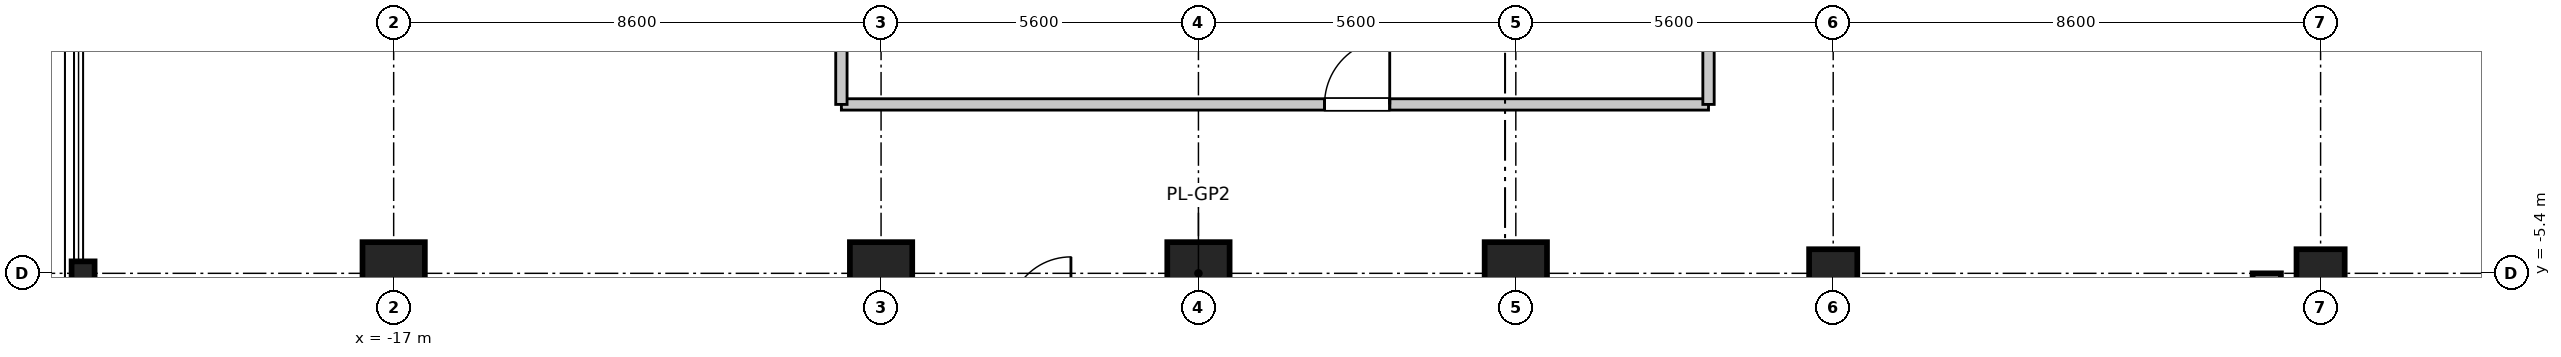
"""IFC4 building model, lengths in metres.
Left out: names, types, materials, properties, quantities, classifications, styles, units other than length and angle.
Written with IfcOpenShell. Run it as: python <this file> out.ifc"""

import sys

from ifc_helpers import new_model, si_unit, direction, frame, frame_2d, origin, origin_2d, place, context, subcontext, project, spatial, rectangle, i_section, extrude, source, transform, mapped, element, fill, save


model = new_model("IFC4")
c1 = context("Model", 3, precision=1e-05, world=origin(), true_north=direction((0.0, 1.0)))
c2 = subcontext(c1, "Body", "Model", "MODEL_VIEW")
j1 = project(units=[si_unit("LENGTHUNIT", "METRE"), si_unit("PLANEANGLEUNIT", "RADIAN")], contexts=[c1])
p1 = place(None, origin())
s1 = spatial("IfcSite", under=j1, at=p1, CompositionType="ELEMENT")
p2 = place(p1, origin())
s2 = spatial("IfcBuilding", under=s1, at=p2, CompositionType="ELEMENT")
p3 = place(p2, frame((0.0, 0.0, 200.1)))
s3 = spatial("IfcBuildingStorey", under=s2, at=p3, CompositionType="ELEMENT", Elevation=200.1)
m1 = source(origin(), c2, "Body", "SweptSolid", [
    extrude(rectangle(XDim=1.1, YDim=1.1, at=origin_2d()), origin(), (0.0, 0.0, 1.0), 4.755),
])
for number, where, z_axis, x_axis in (
    (1, (-17.0, -5.4, 0.0), (0.0, 0.0, 1.0), (1.0, 0.0, 0.0)),
    (2, (-8.4, -5.4, 0.0), (0.0, 0.0, 1.0), (1.0, 0.0, 0.0)),
    (3, (-2.8, -5.4, 0.0), (0.0, 0.0, 1.0), (1.0, 0.0, 0.0)),
    (4, (2.8, -5.4, 0.0), (0.0, 0.0, 1.0), (1.0, 0.0, 0.0)),
):
    element("IfcColumn", number, at=place(p3, frame(where, z_axis=z_axis, x_axis=x_axis)), inside=s3, PredefinedType="COLUMN", context=c2, shape_type="MappedRepresentation", body=[
        mapped(m1, transform((0.0, 0.0, 0.0), scale=1.0)),
    ])
m2 = source(origin(), c2, "Body", "SweptSolid", [
    extrude(rectangle(XDim=0.85, YDim=0.85, at=origin_2d()), origin(), (0.0, 0.0, 1.0), 4.755),
])
for number, where, z_axis, x_axis in (
    (5, (8.4, -5.4, 0.0), (0.0, 0.0, 1.0), (1.0, 0.0, 0.0)),
    (6, (17.0, -5.4, 0.0), (0.0, 0.0, 1.0), (1.0, 0.0, 0.0)),
):
    element("IfcColumn", number, at=place(p3, frame(where, z_axis=z_axis, x_axis=x_axis)), inside=s3, PredefinedType="PILASTER", context=c2, shape_type="MappedRepresentation", body=[
        mapped(m2, transform((0.0, 0.0, 0.0), scale=1.0)),
    ])
m3 = source(origin(), c2, "Body", "SweptSolid", [
    extrude(i_section(OverallWidth=0.406, OverallDepth=0.422, WebThickness=0.019, FlangeThickness=0.03, at=origin_2d()), origin(), (0.0, 0.0, 1.0), 4.861),
])
p4 = place(p3, frame((-22.48, -5.4, 0.0), z_axis=(-0.288002153126, 0.0, 0.957629761335), x_axis=(0.0, -1.0, 0.0)))
e7 = element("IfcColumn", 7, at=p4, inside=s3, PredefinedType="COLUMN", context=c2, shape_type="MappedRepresentation", body=[
    mapped(m3, transform((0.0, 0.0, 0.0), scale=1.0)),
])
m4 = source(origin(), c2, "Body", "SweptSolid", [
    extrude(rectangle(XDim=11.6, YDim=0.5, at=frame_2d((5.8, 0.0))), origin(), (0.0, 0.0, 1.0), 4.51),
])
p5 = place(p3, frame((16.05, -17.0, 0.0), z_axis=(0.0, 0.0, 1.0), x_axis=(0.0, 1.0, 0.0)))
e8 = element("IfcWall", 8, at=p5, inside=s3, PredefinedType="SHEAR", context=c2, shape_type="MappedRepresentation", body=[
    mapped(m4, transform((0.0, 0.0, 0.0), scale=1.0)),
])
m5 = source(origin(), c2, "Body", "SweptSolid", [
    extrude(rectangle(XDim=15.3, YDim=0.2, at=frame_2d((7.65, 0.0))), origin(), (0.0, 0.0, 1.0), 3.4),
])
p6 = place(p3, frame((-9.1, -2.42, 0.0), z_axis=(0.0, 0.0, 1.0), x_axis=(1.0, 0.0, 0.0)))
e9 = element("IfcWall", 9, at=p6, inside=s3, PredefinedType="PARTITIONING", context=c2, shape_type="MappedRepresentation", body=[
    mapped(m5, transform((0.0, 0.0, 0.0), scale=1.0)),
])
p7 = place(p6, frame((8.525, 0.0, 0.0)))
e10 = element("IfcOpeningElement", 10, at=p7, cuts=e9, PredefinedType="OPENING", context=c2, shape_type="SweptSolid", body=[
    extrude(rectangle(XDim=1.15, YDim=2.15, at=frame_2d((0.575, 1.075))), frame((0.0, 0.11, 0.0), z_axis=(0.0, -1.0, 0.0), x_axis=(1.0, 0.0, 0.0)), (0.0, 0.0, 1.0), 0.22),
])
m6 = source(origin(), c2, "Body", "SweptSolid", [
    extrude(rectangle(XDim=4.84, YDim=0.2, at=frame_2d((2.42, 0.0))), origin(), (0.0, 0.0, 1.0), 3.4),
])
for number, where, z_axis, x_axis in (
    (11, (-9.1, -2.42, 0.0), (0.0, 0.0, 1.0), (0.0, 1.0, 0.0)),
    (12, (6.2, -2.42, 0.0), (0.0, 0.0, 1.0), (0.0, 1.0, 0.0)),
):
    element("IfcWall", number, at=place(p3, frame(where, z_axis=z_axis, x_axis=x_axis)), inside=s3, PredefinedType="PARTITIONING", context=c2, shape_type="MappedRepresentation", body=[
        mapped(m6, transform((0.0, 0.0, 0.0), scale=1.0)),
    ])
m7 = source(origin(), c2, "Body", "SweptSolid", [
    extrude(rectangle(XDim=1.15, YDim=2.15, at=frame_2d((0.575, 1.075))), frame((0.0, 0.025, 0.0), z_axis=(0.0, -1.0, 0.0), x_axis=(1.0, 0.0, 0.0)), (0.0, 0.0, 1.0), 0.05),
])
p8 = place(p7, origin())
e13 = element("IfcDoor", 13, at=p8, inside=s3, OperationType="SINGLE_SWING_RIGHT", PredefinedType="DOOR", context=c2, shape_type="MappedRepresentation", body=[
    mapped(m7, transform((0.0, 0.0, 0.0), scale=1.0)),
])
fill(e10, e13)
save(model, sys.argv[1])
